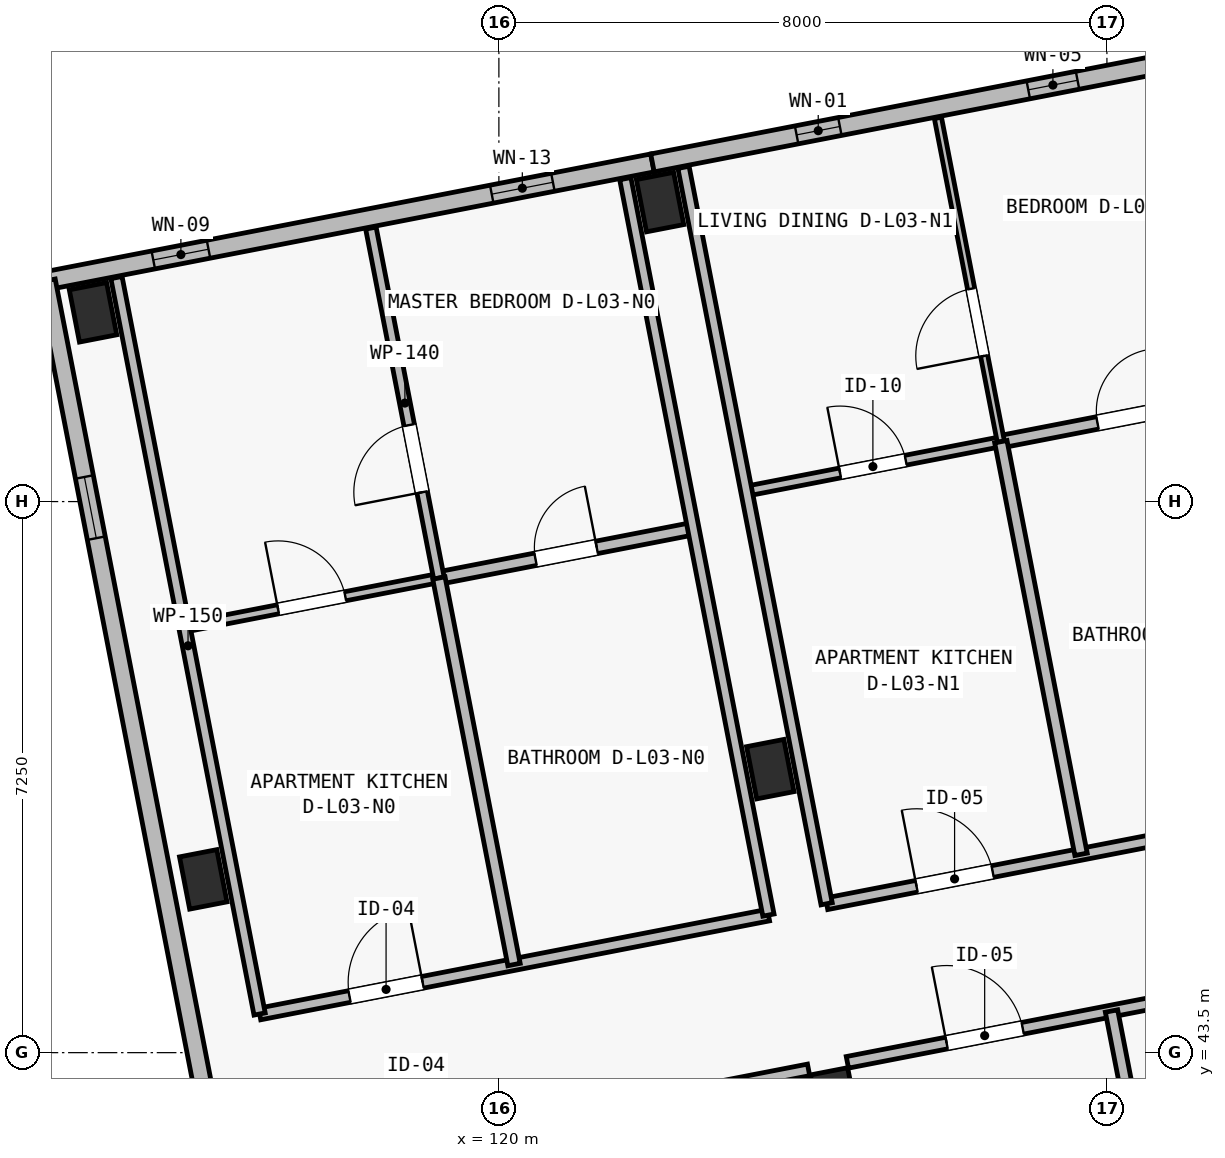
"""IFC4 building model, lengths in metres.
Left out: names, types, materials, properties, quantities, classifications, styles, units other than length and angle.
Written with IfcOpenShell. Run it as: python <this file> out.ifc"""

import sys

from ifc_helpers import new_model, si_unit, direction, frame, frame_2d, origin, origin_2d, place, context, subcontext, project, spatial, rectangle, extrude, element, fill, save


model = new_model("IFC4")
c1 = context("Model", 3, precision=1e-05, world=origin(), true_north=direction((0.0, 1.0)))
c2 = subcontext(c1, "Body", "Model", "MODEL_VIEW")
j1 = project(units=[si_unit("LENGTHUNIT", "METRE"), si_unit("PLANEANGLEUNIT", "RADIAN")], contexts=[c1])
p1 = place(None, origin())
s1 = spatial("IfcSite", under=j1, at=p1, CompositionType="ELEMENT")
p2 = place(p1, origin())
s2 = spatial("IfcBuilding", under=s1, at=p2, CompositionType="ELEMENT")
p3 = place(p2, frame((0.0, 0.0, 11.65)))
s3 = spatial("IfcBuildingStorey", under=s2, at=p3, CompositionType="ELEMENT", Elevation=11.65)
for number, where, z_axis, x_axis in (
    (1, (116.11, 45.78, 0.0), (0.0, 0.0, 1.0), (0.982, 0.191, 0.0)),
    (2, (114.66, 53.24, 0.0), (0.0, 0.0, 1.0), (0.982, 0.191, 0.0)),
    (3, (124.41, 42.91, 0.0), (0.0, 0.0, 1.0), (0.982, 0.191, 0.0)),
    (4, (123.571, 47.23, 0.0), (0.0, 0.0, 1.0), (0.982, 0.191, 0.0)),
    (5, (122.121, 54.69, 0.0), (0.0, 0.0, 1.0), (0.982, 0.191, 0.0)),
):
    element("IfcColumn", number, at=place(p3, frame(where, z_axis=z_axis, x_axis=x_axis)), inside=s3, PredefinedType="COLUMN", context=c2, shape_type="SweptSolid", body=[
        extrude(rectangle(XDim=0.5, YDim=0.7, at=origin_2d()), origin(), (0.0, 0.0, 1.0), 3.25),
    ])
p4 = place(p3, frame((114.045, 53.655, 0.0), z_axis=(0.0, 0.0, 1.0), x_axis=(0.981627273155, 0.190808533872, 0.0)))
e6 = element("IfcWall", 6, at=p4, inside=s3, PredefinedType="SOLIDWALL", context=c2, shape_type="SweptSolid", body=[
    extrude(rectangle(XDim=8.125, YDim=0.24, at=frame_2d((4.062, 0.0))), origin(), (0.0, 0.0, 1.0), 3.0),
])
p5 = place(p4, frame((1.435, 0.0, 0.5)))
e7 = element("IfcOpeningElement", 7, at=p5, cuts=e6, PredefinedType="OPENING", context=c2, shape_type="SweptSolid", body=[
    extrude(rectangle(XDim=0.74, YDim=2.26, at=frame_2d((0.37, 1.13))), frame((0.0, 0.135, 0.0), z_axis=(0.0, -1.0, 0.0), x_axis=(1.0, 0.0, 0.0)), (0.0, 0.0, 1.0), 0.27),
])
p6 = place(p4, frame((5.971, 0.0, 0.44)))
e8 = element("IfcOpeningElement", 8, at=p6, cuts=e6, PredefinedType="OPENING", context=c2, shape_type="SweptSolid", body=[
    extrude(rectangle(XDim=0.82, YDim=2.18, at=frame_2d((0.41, 1.09))), frame((0.0, 0.135, 0.0), z_axis=(0.0, -1.0, 0.0), x_axis=(1.0, 0.0, 0.0)), (0.0, 0.0, 1.0), 0.27),
])
p7 = place(p3, frame((122.02, 55.205, 0.0), z_axis=(0.0, 0.0, 1.0), x_axis=(0.981626422232, 0.190812911449, 0.0)))
e9 = element("IfcWall", 9, at=p7, inside=s3, PredefinedType="SOLIDWALL", context=c2, shape_type="SweptSolid", body=[
    extrude(rectangle(XDim=7.6, YDim=0.24, at=frame_2d((3.8, 0.0))), origin(), (0.0, 0.0, 1.0), 3.0),
])
p8 = place(p7, frame((1.932, 0.0, 0.44)))
e10 = element("IfcOpeningElement", 10, at=p8, cuts=e9, PredefinedType="OPENING", context=c2, shape_type="SweptSolid", body=[
    extrude(rectangle(XDim=0.58, YDim=2.16, at=frame_2d((0.29, 1.08))), frame((0.0, 0.135, 0.0), z_axis=(0.0, -1.0, 0.0), x_axis=(1.0, 0.0, 0.0)), (0.0, 0.0, 1.0), 0.27),
])
p9 = place(p7, frame((5.038, 0.0, 0.5)))
e11 = element("IfcOpeningElement", 11, at=p9, cuts=e9, PredefinedType="OPENING", context=c2, shape_type="SweptSolid", body=[
    extrude(rectangle(XDim=0.66, YDim=2.32, at=frame_2d((0.33, 1.16))), frame((0.0, 0.135, 0.0), z_axis=(0.0, -1.0, 0.0), x_axis=(1.0, 0.0, 0.0)), (0.0, 0.0, 1.0), 0.27),
])
p10 = place(p3, frame((117.985, 33.385, 0.0), z_axis=(0.0, 0.0, 1.0), x_axis=(-0.190808900739, 0.981627201843, 0.0)))
e12 = element("IfcWall", 12, at=p10, inside=s3, PredefinedType="SOLIDWALL", context=c2, shape_type="SweptSolid", body=[
    extrude(rectangle(XDim=20.65, YDim=0.24, at=frame_2d((10.325, 0.0))), origin(), (0.0, 0.0, 1.0), 3.0),
])
p11 = place(p10, frame((2.99, 0.0, 0.52)))
e13 = element("IfcOpeningElement", 13, at=p11, cuts=e12, PredefinedType="OPENING", context=c2, shape_type="SweptSolid", body=[
    extrude(rectangle(XDim=0.68, YDim=2.24, at=frame_2d((0.34, 1.12))), frame((0.0, 0.135, 0.0), z_axis=(0.0, -1.0, 0.0), x_axis=(1.0, 0.0, 0.0)), (0.0, 0.0, 1.0), 0.27),
])
p12 = place(p10, frame((17.2, 0.0, 0.45)))
e14 = element("IfcOpeningElement", 14, at=p12, cuts=e12, PredefinedType="OPENING", context=c2, shape_type="SweptSolid", body=[
    extrude(rectangle(XDim=0.82, YDim=2.18, at=frame_2d((0.41, 1.09))), frame((0.0, 0.135, 0.0), z_axis=(0.0, -1.0, 0.0), x_axis=(1.0, 0.0, 0.0)), (0.0, 0.0, 1.0), 0.27),
])
p13 = place(p3, frame((116.482, 41.797, 0.0), z_axis=(0.0, 0.0, 1.0), x_axis=(0.981629678105, 0.190796161028, 0.0)))
e15 = element("IfcWall", 15, at=p13, inside=s3, PredefinedType="PARTITIONING", context=c2, shape_type="SweptSolid", body=[
    extrude(rectangle(XDim=7.735, YDim=0.155, at=frame_2d((3.868, 0.0))), origin(), (0.0, 0.0, 1.0), 2.97),
])
p14 = place(p13, frame((1.985, 0.0, 0.0)))
e16 = element("IfcOpeningElement", 16, at=p14, cuts=e15, PredefinedType="OPENING", context=c2, shape_type="SweptSolid", body=[
    extrude(rectangle(XDim=0.98, YDim=2.15, at=frame_2d((0.49, 1.075))), frame((0.0, 0.093, 0.0), z_axis=(0.0, -1.0, 0.0), x_axis=(1.0, 0.0, 0.0)), (0.0, 0.0, 1.0), 0.185),
])
p15 = place(p3, frame((124.585, 43.372, 0.0), z_axis=(0.0, 0.0, 1.0), x_axis=(0.9816234647, 0.190828125677, 0.0)))
e17 = element("IfcWall", 17, at=p15, inside=s3, PredefinedType="PARTITIONING", context=c2, shape_type="SweptSolid", body=[
    extrude(rectangle(XDim=7.08, YDim=0.155, at=frame_2d((3.54, 0.0))), origin(), (0.0, 0.0, 1.0), 2.97),
])
p16 = place(p15, frame((1.33, 0.0, 0.0)))
e18 = element("IfcOpeningElement", 18, at=p16, cuts=e17, PredefinedType="OPENING", context=c2, shape_type="SweptSolid", body=[
    extrude(rectangle(XDim=1.02, YDim=2.2, at=frame_2d((0.51, 1.1))), frame((0.0, 0.093, 0.0), z_axis=(0.0, -1.0, 0.0), x_axis=(1.0, 0.0, 0.0)), (0.0, 0.0, 1.0), 0.185),
])
p17 = place(p3, frame((128.837, 40.053, 0.0), z_axis=(0.0, 0.0, 1.0), x_axis=(-0.19081827974, 0.981625378705, 0.0)))
e19 = element("IfcWall", 19, at=p17, inside=s3, PredefinedType="PLUMBINGWALL", context=c2, shape_type="SweptSolid", body=[
    extrude(rectangle(XDim=4.07, YDim=0.165, at=frame_2d((2.035, 0.0))), origin(), (0.0, 0.0, 1.0), 2.97),
])
p18 = place(p3, frame((116.852, 44.009, 0.0), z_axis=(0.0, 0.0, 1.0), x_axis=(0.981629173664, 0.190798756314, 0.0)))
e20 = element("IfcWall", 20, at=p18, inside=s3, PredefinedType="PARTITIONING", context=c2, shape_type="SweptSolid", body=[
    extrude(rectangle(XDim=6.82, YDim=0.155, at=frame_2d((3.41, 0.0))), origin(), (0.0, 0.0, 1.0), 2.97),
])
p19 = place(p18, frame((1.205, 0.0, 0.0)))
e21 = element("IfcOpeningElement", 21, at=p19, cuts=e20, PredefinedType="OPENING", context=c2, shape_type="SweptSolid", body=[
    extrude(rectangle(XDim=0.98, YDim=2.15, at=frame_2d((0.49, 1.075))), frame((0.0, 0.093, 0.0), z_axis=(0.0, -1.0, 0.0), x_axis=(1.0, 0.0, 0.0)), (0.0, 0.0, 1.0), 0.185),
])
p20 = place(p3, frame((115.864, 49.093, 0.0), z_axis=(0.0, 0.0, 1.0), x_axis=(0.98162656706, 0.190812166391, 0.0)))
e22 = element("IfcWall", 22, at=p20, inside=s3, PredefinedType="PARTITIONING", context=c2, shape_type="SweptSolid", body=[
    extrude(rectangle(XDim=3.41, YDim=0.12, at=frame_2d((1.705, 0.0))), origin(), (0.0, 0.0, 1.0), 2.97),
])
p21 = place(p20, frame((1.255, 0.0, 0.0)))
e23 = element("IfcOpeningElement", 23, at=p21, cuts=e22, PredefinedType="OPENING", context=c2, shape_type="SweptSolid", body=[
    extrude(rectangle(XDim=0.9, YDim=2.1, at=frame_2d((0.45, 1.05))), frame((0.0, 0.075, 0.0), z_axis=(0.0, -1.0, 0.0), x_axis=(1.0, 0.0, 0.0)), (0.0, 0.0, 1.0), 0.15),
])
p22 = place(p3, frame((119.211, 49.744, 0.0), z_axis=(0.0, 0.0, 1.0), x_axis=(0.981629173664, 0.190798756314, 0.0)))
e24 = element("IfcWall", 24, at=p22, inside=s3, PredefinedType="PLUMBINGWALL", context=c2, shape_type="SweptSolid", body=[
    extrude(rectangle(XDim=3.41, YDim=0.165, at=frame_2d((1.705, 0.0))), origin(), (0.0, 0.0, 1.0), 2.97),
])
p23 = place(p22, frame((1.295, 0.0, 0.0)))
e25 = element("IfcOpeningElement", 25, at=p23, cuts=e24, PredefinedType="OPENING", context=c2, shape_type="SweptSolid", body=[
    extrude(rectangle(XDim=0.82, YDim=2.08, at=frame_2d((0.41, 1.04))), frame((0.0, 0.097, 0.0), z_axis=(0.0, -1.0, 0.0), x_axis=(1.0, 0.0, 0.0)), (0.0, 0.0, 1.0), 0.195),
])
p24 = place(p3, frame((119.211, 49.744, 0.0), z_axis=(0.0, 0.0, 1.0), x_axis=(-0.190777702748, 0.981633265601, 0.0)))
e26 = element("IfcWall", 26, at=p24, inside=s3, PredefinedType="PARTITIONING", context=c2, shape_type="SweptSolid", body=[
    extrude(rectangle(XDim=4.69, YDim=0.14, at=frame_2d((2.345, 0.0))), origin(), (0.0, 0.0, 1.0), 2.97),
])
p25 = place(p24, frame((1.15, 0.0, 0.0)))
e27 = element("IfcOpeningElement", 27, at=p25, cuts=e26, PredefinedType="OPENING", context=c2, shape_type="SweptSolid", body=[
    extrude(rectangle(XDim=0.9, YDim=2.1, at=frame_2d((0.45, 1.05))), frame((0.0, 0.085, 0.0), z_axis=(0.0, -1.0, 0.0), x_axis=(1.0, 0.0, 0.0)), (0.0, 0.0, 1.0), 0.17),
])
p26 = place(p3, frame((120.199, 44.659, 0.0), z_axis=(0.0, 0.0, 1.0), x_axis=(-0.190838120755, 0.981621521599, 0.0)))
e28 = element("IfcWall", 28, at=p26, inside=s3, PredefinedType="PLUMBINGWALL", context=c2, shape_type="SweptSolid", body=[
    extrude(rectangle(XDim=5.18, YDim=0.165, at=frame_2d((2.59, 0.0))), origin(), (0.0, 0.0, 1.0), 2.97),
])
p27 = place(p3, frame((116.852, 44.009, 0.0), z_axis=(0.0, 0.0, 1.0), x_axis=(-0.190814044018, 0.981626202078, 0.0)))
e29 = element("IfcWall", 29, at=p27, inside=s3, PredefinedType="PARTITIONING", context=c2, shape_type="SweptSolid", body=[
    extrude(rectangle(XDim=9.87, YDim=0.15, at=frame_2d((4.935, 0.0))), origin(), (0.0, 0.0, 1.0), 2.97),
])
p28 = place(p3, frame((123.547, 45.31, 0.0), z_axis=(0.0, 0.0, 1.0), x_axis=(-0.190809410863, 0.981627102685, 0.0)))
e30 = element("IfcWall", 30, at=p28, inside=s3, PredefinedType="PARTITIONING", context=c2, shape_type="SweptSolid", body=[
    extrude(rectangle(XDim=9.87, YDim=0.15, at=frame_2d((4.935, 0.0))), origin(), (0.0, 0.0, 1.0), 2.97),
])
p29 = place(p3, frame((124.312, 45.459, 0.0), z_axis=(0.0, 0.0, 1.0), x_axis=(0.981627870431, 0.190805461121, 0.0)))
e31 = element("IfcWall", 31, at=p29, inside=s3, PredefinedType="PARTITIONING", context=c2, shape_type="SweptSolid", body=[
    extrude(rectangle(XDim=6.82, YDim=0.155, at=frame_2d((3.41, 0.0))), origin(), (0.0, 0.0, 1.0), 2.97),
])
p30 = place(p29, frame((1.205, 0.0, 0.0)))
e32 = element("IfcOpeningElement", 32, at=p30, cuts=e31, PredefinedType="OPENING", context=c2, shape_type="SweptSolid", body=[
    extrude(rectangle(XDim=1.02, YDim=2.2, at=frame_2d((0.51, 1.1))), frame((0.0, 0.093, 0.0), z_axis=(0.0, -1.0, 0.0), x_axis=(1.0, 0.0, 0.0)), (0.0, 0.0, 1.0), 0.185),
])
p31 = place(p3, frame((123.257, 50.887, 0.0), z_axis=(0.0, 0.0, 1.0), x_axis=(0.981629173664, 0.190798756314, 0.0)))
e33 = element("IfcWall", 33, at=p31, inside=s3, PredefinedType="PARTITIONING", context=c2, shape_type="SweptSolid", body=[
    extrude(rectangle(XDim=3.41, YDim=0.13, at=frame_2d((1.705, 0.0))), origin(), (0.0, 0.0, 1.0), 2.97),
])
p32 = place(p31, frame((1.255, 0.0, 0.0)))
e34 = element("IfcOpeningElement", 34, at=p32, cuts=e33, PredefinedType="OPENING", context=c2, shape_type="SweptSolid", body=[
    extrude(rectangle(XDim=0.88, YDim=2.1, at=frame_2d((0.44, 1.05))), frame((0.0, 0.08, 0.0), z_axis=(0.0, -1.0, 0.0), x_axis=(1.0, 0.0, 0.0)), (0.0, 0.0, 1.0), 0.16),
])
p33 = place(p3, frame((126.604, 51.538, 0.0), z_axis=(0.0, 0.0, 1.0), x_axis=(0.98162656706, 0.190812166391, 0.0)))
e35 = element("IfcWall", 35, at=p33, inside=s3, PredefinedType="PLUMBINGWALL", context=c2, shape_type="SweptSolid", body=[
    extrude(rectangle(XDim=3.41, YDim=0.165, at=frame_2d((1.705, 0.0))), origin(), (0.0, 0.0, 1.0), 2.97),
])
p34 = place(p33, frame((1.295, 0.0, 0.0)))
e36 = element("IfcOpeningElement", 36, at=p34, cuts=e35, PredefinedType="OPENING", context=c2, shape_type="SweptSolid", body=[
    extrude(rectangle(XDim=0.82, YDim=2.08, at=frame_2d((0.41, 1.04))), frame((0.0, 0.097, 0.0), z_axis=(0.0, -1.0, 0.0), x_axis=(1.0, 0.0, 0.0)), (0.0, 0.0, 1.0), 0.195),
])
p35 = place(p3, frame((126.604, 51.538, 0.0), z_axis=(0.0, 0.0, 1.0), x_axis=(-0.190812443151, 0.981626513262, 0.0)))
e37 = element("IfcWall", 37, at=p35, inside=s3, PredefinedType="PARTITIONING", context=c2, shape_type="SweptSolid", body=[
    extrude(rectangle(XDim=4.34, YDim=0.095, at=frame_2d((2.17, 0.0))), origin(), (0.0, 0.0, 1.0), 2.97),
])
p36 = place(p35, frame((1.15, 0.0, 0.0)))
e38 = element("IfcOpeningElement", 38, at=p36, cuts=e37, PredefinedType="OPENING", context=c2, shape_type="SweptSolid", body=[
    extrude(rectangle(XDim=0.9, YDim=2.1, at=frame_2d((0.45, 1.05))), frame((0.0, 0.062, 0.0), z_axis=(0.0, -1.0, 0.0), x_axis=(1.0, 0.0, 0.0)), (0.0, 0.0, 1.0), 0.125),
])
p37 = place(p3, frame((127.66, 46.109, 0.0), z_axis=(0.0, 0.0, 1.0), x_axis=(-0.190815300433, 0.981625957848, 0.0)))
e39 = element("IfcWall", 39, at=p37, inside=s3, PredefinedType="PLUMBINGWALL", context=c2, shape_type="SweptSolid", body=[
    extrude(rectangle(XDim=5.53, YDim=0.165, at=frame_2d((2.765, 0.0))), origin(), (0.0, 0.0, 1.0), 2.97),
])
p38 = place(p3, frame((124.312, 45.459, 0.0), z_axis=(0.0, 0.0, 1.0), x_axis=(-0.190814044018, 0.981626202078, 0.0)))
e40 = element("IfcWall", 40, at=p38, inside=s3, PredefinedType="PARTITIONING", context=c2, shape_type="SweptSolid", body=[
    extrude(rectangle(XDim=9.87, YDim=0.15, at=frame_2d((4.935, 0.0))), origin(), (0.0, 0.0, 1.0), 2.97),
])
p39 = place(p5, origin())
e41 = element("IfcWindow", 41, at=p39, inside=s3, PartitioningType="SINGLE_PANEL", PredefinedType="WINDOW", context=c2, shape_type="SweptSolid", body=[
    extrude(rectangle(XDim=0.74, YDim=2.26, at=frame_2d((0.37, 1.13))), frame((0.0, 0.03, 0.0), z_axis=(0.0, -1.0, 0.0), x_axis=(1.0, 0.0, 0.0)), (0.0, 0.0, 1.0), 0.06),
])
fill(e7, e41)
p40 = place(p6, origin())
e42 = element("IfcWindow", 42, at=p40, inside=s3, PartitioningType="SINGLE_PANEL", PredefinedType="WINDOW", context=c2, shape_type="SweptSolid", body=[
    extrude(rectangle(XDim=0.82, YDim=2.18, at=frame_2d((0.41, 1.09))), frame((0.0, 0.03, 0.0), z_axis=(0.0, -1.0, 0.0), x_axis=(1.0, 0.0, 0.0)), (0.0, 0.0, 1.0), 0.06),
])
fill(e8, e42)
p41 = place(p8, origin())
e43 = element("IfcWindow", 43, at=p41, inside=s3, PartitioningType="SINGLE_PANEL", PredefinedType="WINDOW", context=c2, shape_type="SweptSolid", body=[
    extrude(rectangle(XDim=0.58, YDim=2.16, at=frame_2d((0.29, 1.08))), frame((0.0, 0.03, 0.0), z_axis=(0.0, -1.0, 0.0), x_axis=(1.0, 0.0, 0.0)), (0.0, 0.0, 1.0), 0.06),
])
fill(e10, e43)
p42 = place(p9, origin())
e44 = element("IfcWindow", 44, at=p42, inside=s3, PartitioningType="SINGLE_PANEL", PredefinedType="WINDOW", context=c2, shape_type="SweptSolid", body=[
    extrude(rectangle(XDim=0.66, YDim=2.32, at=frame_2d((0.33, 1.16))), frame((0.0, 0.03, 0.0), z_axis=(0.0, -1.0, 0.0), x_axis=(1.0, 0.0, 0.0)), (0.0, 0.0, 1.0), 0.06),
])
fill(e11, e44)
p43 = place(p12, origin())
e45 = element("IfcWindow", 45, at=p43, inside=s3, PartitioningType="SINGLE_PANEL", PredefinedType="WINDOW", context=c2, shape_type="SweptSolid", body=[
    extrude(rectangle(XDim=0.82, YDim=2.18, at=frame_2d((0.41, 1.09))), frame((0.0, 0.03, 0.0), z_axis=(0.0, -1.0, 0.0), x_axis=(1.0, 0.0, 0.0)), (0.0, 0.0, 1.0), 0.06),
])
fill(e14, e45)
p44 = place(p16, origin())
e46 = element("IfcDoor", 46, at=p44, inside=s3, OperationType="SINGLE_SWING_LEFT", PredefinedType="DOOR", context=c2, shape_type="SweptSolid", body=[
    extrude(rectangle(XDim=1.02, YDim=2.2, at=frame_2d((0.51, 1.1))), frame((0.0, 0.025, 0.0), z_axis=(0.0, -1.0, 0.0), x_axis=(1.0, 0.0, 0.0)), (0.0, 0.0, 1.0), 0.05),
])
fill(e18, e46)
p45 = place(p19, origin())
e47 = element("IfcDoor", 47, at=p45, inside=s3, OperationType="SINGLE_SWING_RIGHT", PredefinedType="DOOR", context=c2, shape_type="SweptSolid", body=[
    extrude(rectangle(XDim=0.98, YDim=2.15, at=frame_2d((0.49, 1.075))), frame((0.0, 0.025, 0.0), z_axis=(0.0, -1.0, 0.0), x_axis=(1.0, 0.0, 0.0)), (0.0, 0.0, 1.0), 0.05),
])
fill(e21, e47)
p46 = place(p21, origin())
e48 = element("IfcDoor", 48, at=p46, inside=s3, OperationType="SINGLE_SWING_LEFT", PredefinedType="DOOR", context=c2, shape_type="SweptSolid", body=[
    extrude(rectangle(XDim=0.9, YDim=2.1, at=frame_2d((0.45, 1.05))), frame((0.0, 0.025, 0.0), z_axis=(0.0, -1.0, 0.0), x_axis=(1.0, 0.0, 0.0)), (0.0, 0.0, 1.0), 0.05),
])
fill(e23, e48)
p47 = place(p23, origin())
e49 = element("IfcDoor", 49, at=p47, inside=s3, OperationType="SINGLE_SWING_RIGHT", PredefinedType="DOOR", context=c2, shape_type="SweptSolid", body=[
    extrude(rectangle(XDim=0.82, YDim=2.08, at=frame_2d((0.41, 1.04))), frame((0.0, 0.025, 0.0), z_axis=(0.0, -1.0, 0.0), x_axis=(1.0, 0.0, 0.0)), (0.0, 0.0, 1.0), 0.05),
])
fill(e25, e49)
p48 = place(p25, origin())
e50 = element("IfcDoor", 50, at=p48, inside=s3, OperationType="SINGLE_SWING_LEFT", PredefinedType="DOOR", context=c2, shape_type="SweptSolid", body=[
    extrude(rectangle(XDim=0.9, YDim=2.1, at=frame_2d((0.45, 1.05))), frame((0.0, 0.025, 0.0), z_axis=(0.0, -1.0, 0.0), x_axis=(1.0, 0.0, 0.0)), (0.0, 0.0, 1.0), 0.05),
])
fill(e27, e50)
p49 = place(p30, origin())
e51 = element("IfcDoor", 51, at=p49, inside=s3, OperationType="SINGLE_SWING_LEFT", PredefinedType="DOOR", context=c2, shape_type="SweptSolid", body=[
    extrude(rectangle(XDim=1.02, YDim=2.2, at=frame_2d((0.51, 1.1))), frame((0.0, 0.025, 0.0), z_axis=(0.0, -1.0, 0.0), x_axis=(1.0, 0.0, 0.0)), (0.0, 0.0, 1.0), 0.05),
])
fill(e32, e51)
p50 = place(p32, origin())
e52 = element("IfcDoor", 52, at=p50, inside=s3, OperationType="SINGLE_SWING_LEFT", PredefinedType="DOOR", context=c2, shape_type="SweptSolid", body=[
    extrude(rectangle(XDim=0.88, YDim=2.1, at=frame_2d((0.44, 1.05))), frame((0.0, 0.025, 0.0), z_axis=(0.0, -1.0, 0.0), x_axis=(1.0, 0.0, 0.0)), (0.0, 0.0, 1.0), 0.05),
])
fill(e34, e52)
p51 = place(p34, origin())
e53 = element("IfcDoor", 53, at=p51, inside=s3, OperationType="SINGLE_SWING_RIGHT", PredefinedType="DOOR", context=c2, shape_type="SweptSolid", body=[
    extrude(rectangle(XDim=0.82, YDim=2.08, at=frame_2d((0.41, 1.04))), frame((0.0, 0.025, 0.0), z_axis=(0.0, -1.0, 0.0), x_axis=(1.0, 0.0, 0.0)), (0.0, 0.0, 1.0), 0.05),
])
fill(e36, e53)
p52 = place(p36, origin())
e54 = element("IfcDoor", 54, at=p52, inside=s3, OperationType="SINGLE_SWING_LEFT", PredefinedType="DOOR", context=c2, shape_type="SweptSolid", body=[
    extrude(rectangle(XDim=0.9, YDim=2.1, at=frame_2d((0.45, 1.05))), frame((0.0, 0.025, 0.0), z_axis=(0.0, -1.0, 0.0), x_axis=(1.0, 0.0, 0.0)), (0.0, 0.0, 1.0), 0.05),
])
fill(e38, e54)
save(model, sys.argv[1])
